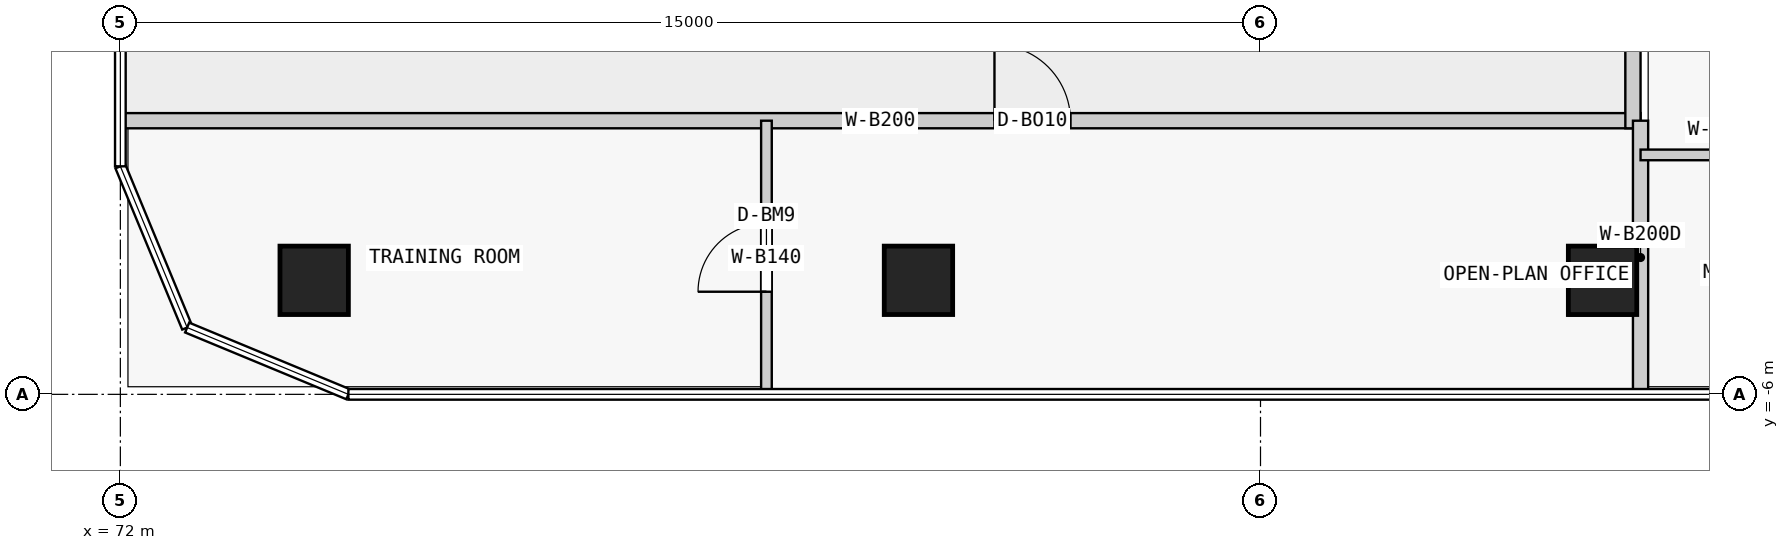
"""IFC4 building model, lengths in metres.
Left out: names, types, materials, properties, quantities, classifications, styles, units other than length and angle.
Written with IfcOpenShell. Run it as: python <this file> out.ifc"""

import sys

from ifc_helpers import new_model, si_unit, direction, frame, frame_2d, origin, origin_2d, place, context, subcontext, project, spatial, rectangle, extrude, element, fill, save


model = new_model("IFC4")
c1 = context("Model", 3, precision=1e-05, world=origin(), true_north=direction((0.0, 1.0)))
c2 = subcontext(c1, "Body", "Model", "MODEL_VIEW")
j1 = project(units=[si_unit("LENGTHUNIT", "METRE"), si_unit("PLANEANGLEUNIT", "RADIAN")], contexts=[c1])
p1 = place(None, origin())
s1 = spatial("IfcSite", under=j1, at=p1, CompositionType="ELEMENT")
p2 = place(p1, origin())
s2 = spatial("IfcBuilding", under=s1, at=p2, CompositionType="ELEMENT")
p3 = place(p2, frame((0.0, 0.0, 88.8)))
s3 = spatial("IfcBuildingStorey", under=s2, at=p3, CompositionType="ELEMENT", Elevation=88.8)
for number, where, z_axis, x_axis in (
    (1, (74.55, -4.5, 0.0), (0.0, 0.0, 1.0), (1.0, 0.0, 0.0)),
    (2, (82.5, -4.5, 0.0), (0.0, 0.0, 1.0), (1.0, 0.0, 0.0)),
    (3, (91.5, -4.5, 0.0), (0.0, 0.0, 1.0), (1.0, 0.0, 0.0)),
):
    element("IfcColumn", number, at=place(p3, frame(where, z_axis=z_axis, x_axis=x_axis)), inside=s3, PredefinedType="COLUMN", context=c2, shape_type="SweptSolid", body=[
        extrude(rectangle(XDim=0.9, YDim=0.9, at=origin_2d()), origin(), (0.0, 0.0, 1.0), 3.5),
    ])
p4 = place(p3, frame((72.0, -2.4, 0.0), z_axis=(0.0, 0.0, 1.0), x_axis=(1.0, 0.0, 0.0)))
e4 = element("IfcWall", 4, at=p4, inside=s3, PredefinedType="PARTITIONING", context=c2, shape_type="SweptSolid", body=[
    extrude(rectangle(XDim=20.0, YDim=0.2, at=frame_2d((10.0, 0.0))), origin(), (0.0, 0.0, 1.0), 3.25),
])
p5 = place(p4, frame((11.5, 0.0, 0.0)))
e5 = element("IfcOpeningElement", 5, at=p5, cuts=e4, PredefinedType="OPENING", context=c2, shape_type="SweptSolid", body=[
    extrude(rectangle(XDim=1.0, YDim=2.4, at=frame_2d((0.5, 1.2))), frame((0.0, 0.11, 0.0), z_axis=(0.0, -1.0, 0.0), x_axis=(1.0, 0.0, 0.0)), (0.0, 0.0, 1.0), 0.22),
])
p6 = place(p3, frame((91.9, -2.5, 0.0), z_axis=(0.0, 0.0, 1.0), x_axis=(0.0, 1.0, 0.0)))
e6 = element("IfcWall", 6, at=p6, inside=s3, PredefinedType="PARTITIONING", context=c2, shape_type="SweptSolid", body=[
    extrude(rectangle(XDim=12.1, YDim=0.2, at=frame_2d((6.05, 0.0))), origin(), (0.0, 0.0, 1.0), 3.25),
])
p7 = place(p6, frame((8.3, 0.0, 0.0)))
e7 = element("IfcOpeningElement", 7, at=p7, cuts=e6, PredefinedType="OPENING", context=c2, shape_type="SweptSolid", body=[
    extrude(rectangle(XDim=1.4, YDim=2.4, at=frame_2d((0.7, 1.2))), frame((0.0, 0.11, 0.0), z_axis=(0.0, -1.0, 0.0), x_axis=(1.0, 0.0, 0.0)), (0.0, 0.0, 1.0), 0.22),
])
p8 = place(p3, frame((92.0, -6.0, 0.0), z_axis=(0.0, 0.0, 1.0), x_axis=(0.0, 1.0, 0.0)))
e8 = element("IfcWall", 8, at=p8, inside=s3, PredefinedType="PARTITIONING", context=c2, shape_type="SweptSolid", body=[
    extrude(rectangle(XDim=3.6, YDim=0.2, at=frame_2d((1.8, 0.0))), origin(), (0.0, 0.0, 1.0), 3.25),
])
p9 = place(p3, frame((80.5, -6.0, 0.0), z_axis=(0.0, 0.0, 1.0), x_axis=(0.0, 1.0, 0.0)))
e9 = element("IfcWall", 9, at=p9, inside=s3, PredefinedType="PARTITIONING", context=c2, shape_type="SweptSolid", body=[
    extrude(rectangle(XDim=3.6, YDim=0.14, at=frame_2d((1.8, 0.0))), origin(), (0.0, 0.0, 1.0), 3.25),
])
p10 = place(p9, frame((1.35, 0.0, 0.0)))
e10 = element("IfcOpeningElement", 10, at=p10, cuts=e9, PredefinedType="OPENING", context=c2, shape_type="SweptSolid", body=[
    extrude(rectangle(XDim=0.9, YDim=2.4, at=frame_2d((0.45, 1.2))), frame((0.0, 0.08, 0.0), z_axis=(0.0, -1.0, 0.0), x_axis=(1.0, 0.0, 0.0)), (0.0, 0.0, 1.0), 0.16),
])
p11 = place(p3, frame((92.0, -2.85, 0.0), z_axis=(0.0, 0.0, 1.0), x_axis=(1.0, 0.0, 0.0)))
e11 = element("IfcWall", 11, at=p11, inside=s3, PredefinedType="PARTITIONING", context=c2, shape_type="SweptSolid", body=[
    extrude(rectangle(XDim=3.38, YDim=0.14, at=frame_2d((1.69, 0.0))), origin(), (0.0, 0.0, 1.0), 3.25),
])
p12 = place(p5, origin())
e12 = element("IfcDoor", 12, at=p12, inside=s3, OperationType="SINGLE_SWING_LEFT", PredefinedType="DOOR", context=c2, shape_type="SweptSolid", body=[
    extrude(rectangle(XDim=1.0, YDim=2.4, at=frame_2d((0.5, 1.2))), frame((0.0, 0.025, 0.0), z_axis=(0.0, -1.0, 0.0), x_axis=(1.0, 0.0, 0.0)), (0.0, 0.0, 1.0), 0.05),
])
fill(e5, e12)
p13 = place(p10, origin())
e13 = element("IfcDoor", 13, at=p13, inside=s3, OperationType="SINGLE_SWING_LEFT", PredefinedType="DOOR", context=c2, shape_type="SweptSolid", body=[
    extrude(rectangle(XDim=0.9, YDim=2.4, at=frame_2d((0.45, 1.2))), frame((0.0, 0.025, 0.0), z_axis=(0.0, -1.0, 0.0), x_axis=(1.0, 0.0, 0.0)), (0.0, 0.0, 1.0), 0.05),
])
fill(e10, e13)
save(model, sys.argv[1])
